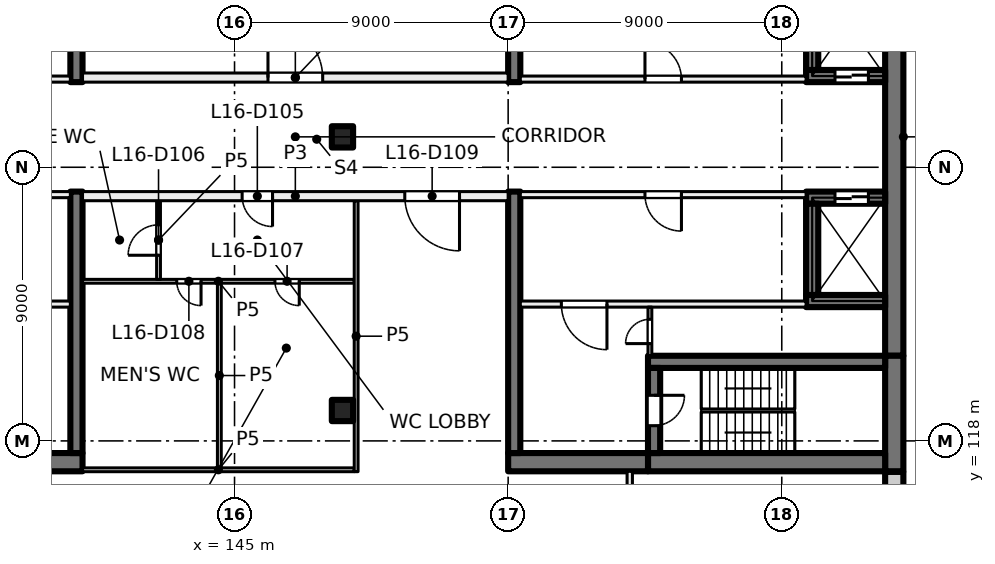
"""IFC4 building model, lengths in metres.
Left out: names, types, materials, properties, quantities, classifications, styles, units other than length and angle.
Written with IfcOpenShell. Run it as: python <this file> out.ifc"""

import sys

from ifc_helpers import new_model, si_unit, direction, frame, frame_2d, origin, origin_2d, place, context, subcontext, project, spatial, rectangle, extrude, element, fill, save


model = new_model("IFC4")
c1 = context("Model", 3, precision=1e-05, world=origin(), true_north=direction((0.0, 1.0)))
c2 = subcontext(c1, "Body", "Model", "MODEL_VIEW")
j1 = project(units=[si_unit("LENGTHUNIT", "METRE"), si_unit("PLANEANGLEUNIT", "RADIAN")], contexts=[c1])
p1 = place(None, origin())
s1 = spatial("IfcSite", under=j1, at=p1, CompositionType="ELEMENT")
p2 = place(p1, origin())
s2 = spatial("IfcBuilding", under=s1, at=p2, CompositionType="ELEMENT")
p3 = place(p2, frame((0.0, 0.0, 71.5)))
s3 = spatial("IfcBuildingStorey", under=s2, at=p3, CompositionType="ELEMENT", Elevation=71.5)
for number, where, z_axis, x_axis in (
    (1, (148.55, 119.0, 0.0), (0.0, 0.0, 1.0), (1.0, 0.0, 0.0)),
    (2, (148.55, 128.0, 0.0), (0.0, 0.0, 1.0), (1.0, 0.0, 0.0)),
):
    element("IfcColumn", number, at=place(p3, frame(where, z_axis=z_axis, x_axis=x_axis)), inside=s3, PredefinedType="COLUMN", context=c2, shape_type="SweptSolid", body=[
        extrude(rectangle(XDim=0.7, YDim=0.7, at=origin_2d()), origin(), (0.0, 0.0, 1.0), 4.0),
    ])
p4 = place(p3, frame((135.4, 117.3, 0.0), z_axis=(0.0, 0.0, 1.0), x_axis=(1.0, 0.0, 0.0)))
e3 = element("IfcWall", 3, at=p4, inside=s3, PredefinedType="SHEAR", context=c2, shape_type="SweptSolid", body=[
    extrude(rectangle(XDim=4.6, YDim=0.6, at=frame_2d((2.3, 0.0))), origin(), (0.0, 0.0, 1.0), 4.0),
])
for number, where, z_axis, x_axis in (
    (4, (139.8, 117.6, 0.0), (0.0, 0.0, 1.0), (0.0, 1.0, 0.0)),
    (5, (139.8, 129.8, 0.0), (0.0, 0.0, 1.0), (0.0, 1.0, 0.0)),
):
    element("IfcWall", number, at=place(p3, frame(where, z_axis=z_axis, x_axis=x_axis)), inside=s3, PredefinedType="SHEAR", context=c2, shape_type="SweptSolid", body=[
        extrude(rectangle(XDim=8.6, YDim=0.4, at=frame_2d((4.3, 0.0))), origin(), (0.0, 0.0, 1.0), 4.0),
    ])
p5 = place(p3, frame((166.7, 135.2, 0.0), z_axis=(0.0, 0.0, 1.0), x_axis=(0.0, -1.0, 0.0)))
e6 = element("IfcWall", 6, at=p5, inside=s3, PredefinedType="SHEAR", context=c2, shape_type="SweptSolid", body=[
    extrude(rectangle(XDim=14.4, YDim=0.6, at=frame_2d((7.2, 0.0))), origin(), (0.0, 0.0, 1.0), 4.0),
])
p6 = place(p3, frame((166.7, 120.8, 0.0), z_axis=(0.0, 0.0, 1.0), x_axis=(0.0, -1.0, 0.0)))
e7 = element("IfcWall", 7, at=p6, inside=s3, PredefinedType="SHEAR", context=c2, shape_type="SweptSolid", body=[
    extrude(rectangle(XDim=3.8, YDim=0.6, at=frame_2d((1.9, 0.0))), origin(), (0.0, 0.0, 1.0), 4.0),
])
p7 = place(p3, frame((166.4, 117.3, 0.0), z_axis=(0.0, 0.0, 1.0), x_axis=(-1.0, 0.0, 0.0)))
e8 = element("IfcWall", 8, at=p7, inside=s3, PredefinedType="SHEAR", context=c2, shape_type="SweptSolid", body=[
    extrude(rectangle(XDim=7.8, YDim=0.6, at=frame_2d((3.9, 0.0))), origin(), (0.0, 0.0, 1.0), 4.0),
])
p8 = place(p3, frame((158.6, 117.3, 0.0), z_axis=(0.0, 0.0, 1.0), x_axis=(-1.0, 0.0, 0.0)))
e9 = element("IfcWall", 9, at=p8, inside=s3, PredefinedType="SHEAR", context=c2, shape_type="SweptSolid", body=[
    extrude(rectangle(XDim=4.6, YDim=0.6, at=frame_2d((2.3, 0.0))), origin(), (0.0, 0.0, 1.0), 4.0),
])
p9 = place(p3, frame((166.4, 120.6, 0.0), z_axis=(0.0, 0.0, 1.0), x_axis=(-1.0, 0.0, 0.0)))
e10 = element("IfcWall", 10, at=p9, inside=s3, PredefinedType="SHEAR", context=c2, shape_type="SweptSolid", body=[
    extrude(rectangle(XDim=7.8, YDim=0.4, at=frame_2d((3.9, 0.0))), origin(), (0.0, 0.0, 1.0), 4.0),
])
p10 = place(p3, frame((158.8, 120.4, 0.0), z_axis=(0.0, 0.0, 1.0), x_axis=(0.0, -1.0, 0.0)))
e11 = element("IfcWall", 11, at=p10, inside=s3, PredefinedType="SHEAR", context=c2, shape_type="SweptSolid", body=[
    extrude(rectangle(XDim=2.8, YDim=0.4, at=frame_2d((1.4, 0.0))), origin(), (0.0, 0.0, 1.0), 4.0),
])
p11 = place(p10, frame((0.9, 0.0, 0.0)))
e12 = element("IfcOpeningElement", 12, at=p11, cuts=e11, PredefinedType="OPENING", context=c2, shape_type="SweptSolid", body=[
    extrude(rectangle(XDim=1.0, YDim=2.1, at=frame_2d((0.5, 1.05))), frame((0.0, 0.21, 0.0), z_axis=(0.0, -1.0, 0.0), x_axis=(1.0, 0.0, 0.0)), (0.0, 0.0, 1.0), 0.42),
])
p12 = place(p3, frame((166.4, 130.0, 0.0), z_axis=(0.0, 0.0, 1.0), x_axis=(-1.0, 0.0, 0.0)))
e13 = element("IfcWall", 13, at=p12, inside=s3, PredefinedType="SHEAR", context=c2, shape_type="SweptSolid", body=[
    extrude(rectangle(XDim=2.6, YDim=0.4, at=frame_2d((1.3, 0.0))), origin(), (0.0, 0.0, 1.0), 4.0),
])
p13 = place(p12, frame((0.55, 0.0, 0.0)))
e14 = element("IfcOpeningElement", 14, at=p13, cuts=e13, PredefinedType="OPENING", context=c2, shape_type="SweptSolid", body=[
    extrude(rectangle(XDim=1.1, YDim=2.1, at=frame_2d((0.55, 1.05))), frame((0.0, 0.21, 0.0), z_axis=(0.0, -1.0, 0.0), x_axis=(1.0, 0.0, 0.0)), (0.0, 0.0, 1.0), 0.42),
])
p14 = place(p3, frame((164.0, 133.2, 0.0), z_axis=(0.0, 0.0, 1.0), x_axis=(0.0, -1.0, 0.0)))
e15 = element("IfcWall", 15, at=p14, inside=s3, PredefinedType="SHEAR", context=c2, shape_type="SweptSolid", body=[
    extrude(rectangle(XDim=3.0, YDim=0.4, at=frame_2d((1.5, 0.0))), origin(), (0.0, 0.0, 1.0), 4.0),
])
p15 = place(p3, frame((166.4, 126.0, 0.0), z_axis=(0.0, 0.0, 1.0), x_axis=(-1.0, 0.0, 0.0)))
e16 = element("IfcWall", 16, at=p15, inside=s3, PredefinedType="SHEAR", context=c2, shape_type="SweptSolid", body=[
    extrude(rectangle(XDim=2.6, YDim=0.4, at=frame_2d((1.3, 0.0))), origin(), (0.0, 0.0, 1.0), 4.0),
])
p16 = place(p15, frame((0.55, 0.0, 0.0)))
e17 = element("IfcOpeningElement", 17, at=p16, cuts=e16, PredefinedType="OPENING", context=c2, shape_type="SweptSolid", body=[
    extrude(rectangle(XDim=1.1, YDim=2.1, at=frame_2d((0.55, 1.05))), frame((0.0, 0.21, 0.0), z_axis=(0.0, -1.0, 0.0), x_axis=(1.0, 0.0, 0.0)), (0.0, 0.0, 1.0), 0.42),
])
p17 = place(p3, frame((166.4, 122.6, 0.0), z_axis=(0.0, 0.0, 1.0), x_axis=(-1.0, 0.0, 0.0)))
e18 = element("IfcWall", 18, at=p17, inside=s3, PredefinedType="SHEAR", context=c2, shape_type="SweptSolid", body=[
    extrude(rectangle(XDim=2.6, YDim=0.4, at=frame_2d((1.3, 0.0))), origin(), (0.0, 0.0, 1.0), 4.0),
])
p18 = place(p3, frame((164.0, 125.8, 0.0), z_axis=(0.0, 0.0, 1.0), x_axis=(0.0, -1.0, 0.0)))
e19 = element("IfcWall", 19, at=p18, inside=s3, PredefinedType="SHEAR", context=c2, shape_type="SweptSolid", body=[
    extrude(rectangle(XDim=3.0, YDim=0.4, at=frame_2d((1.5, 0.0))), origin(), (0.0, 0.0, 1.0), 4.0),
])
for number, where, z_axis, x_axis in (
    (20, (154.2, 138.4, 0.0), (0.0, 0.0, 1.0), (0.0, -1.0, 0.0)),
    (21, (154.2, 126.2, 0.0), (0.0, 0.0, 1.0), (0.0, -1.0, 0.0)),
):
    element("IfcWall", number, at=place(p3, frame(where, z_axis=z_axis, x_axis=x_axis)), inside=s3, PredefinedType="SHEAR", context=c2, shape_type="SweptSolid", body=[
        extrude(rectangle(XDim=8.6, YDim=0.4, at=frame_2d((4.3, 0.0))), origin(), (0.0, 0.0, 1.0), 4.0),
    ])
p19 = place(p3, frame((166.7, 116.98, 0.0), z_axis=(0.0, 0.0, 1.0), x_axis=(0.0, -1.0, 0.0)))
e22 = element("IfcWall", 22, at=p19, inside=s3, PredefinedType="SOLIDWALL", context=c2, shape_type="SweptSolid", body=[
    extrude(rectangle(XDim=2.98, YDim=0.6, at=frame_2d((1.49, 0.0))), origin(), (0.0, 0.0, 1.0), 3.625),
])
p20 = place(p3, frame((135.0, 129.9, 0.0), z_axis=(0.0, 0.0, 1.0), x_axis=(1.0, 0.0, 0.0)))
e23 = element("IfcWall", 23, at=p20, inside=s3, PredefinedType="PARTITIONING", context=c2, shape_type="SweptSolid", body=[
    extrude(rectangle(XDim=4.6, YDim=0.2, at=frame_2d((2.3, 0.0))), origin(), (0.0, 0.0, 1.0), 3.625),
])
p21 = place(p20, frame((1.7, 0.0, 0.0)))
e24 = element("IfcOpeningElement", 24, at=p21, cuts=e23, PredefinedType="OPENING", context=c2, shape_type="SweptSolid", body=[
    extrude(rectangle(XDim=1.2, YDim=2.1, at=frame_2d((0.6, 1.05))), frame((0.0, 0.11, 0.0), z_axis=(0.0, -1.0, 0.0), x_axis=(1.0, 0.0, 0.0)), (0.0, 0.0, 1.0), 0.22),
])
p22 = place(p3, frame((139.6, 126.1, 0.0), z_axis=(0.0, 0.0, 1.0), x_axis=(-1.0, 0.0, 0.0)))
e25 = element("IfcWall", 25, at=p22, inside=s3, PredefinedType="PARTITIONING", context=c2, shape_type="SweptSolid", body=[
    extrude(rectangle(XDim=4.6, YDim=0.2, at=frame_2d((2.3, 0.0))), origin(), (0.0, 0.0, 1.0), 3.625),
])
p23 = place(p22, frame((1.7, 0.0, 0.0)))
e26 = element("IfcOpeningElement", 26, at=p23, cuts=e25, PredefinedType="OPENING", context=c2, shape_type="SweptSolid", body=[
    extrude(rectangle(XDim=1.2, YDim=2.1, at=frame_2d((0.6, 1.05))), frame((0.0, 0.11, 0.0), z_axis=(0.0, -1.0, 0.0), x_axis=(1.0, 0.0, 0.0)), (0.0, 0.0, 1.0), 0.22),
])
p24 = place(p3, frame((139.6, 122.5, 0.0), z_axis=(0.0, 0.0, 1.0), x_axis=(-1.0, 0.0, 0.0)))
e27 = element("IfcWall", 27, at=p24, inside=s3, PredefinedType="PARTITIONING", context=c2, shape_type="SweptSolid", body=[
    extrude(rectangle(XDim=4.6, YDim=0.2, at=frame_2d((2.3, 0.0))), origin(), (0.0, 0.0, 1.0), 3.625),
])
p25 = place(p24, frame((1.35, 0.0, 0.0)))
e28 = element("IfcOpeningElement", 28, at=p25, cuts=e27, PredefinedType="OPENING", context=c2, shape_type="SweptSolid", body=[
    extrude(rectangle(XDim=1.5, YDim=2.1, at=frame_2d((0.75, 1.05))), frame((0.0, 0.11, 0.0), z_axis=(0.0, -1.0, 0.0), x_axis=(1.0, 0.0, 0.0)), (0.0, 0.0, 1.0), 0.22),
])
p26 = place(p3, frame((163.8, 126.1, 0.0), z_axis=(0.0, 0.0, 1.0), x_axis=(-1.0, 0.0, 0.0)))
e29 = element("IfcWall", 29, at=p26, inside=s3, PredefinedType="PARTITIONING", context=c2, shape_type="SweptSolid", body=[
    extrude(rectangle(XDim=9.4, YDim=0.2, at=frame_2d((4.7, 0.0))), origin(), (0.0, 0.0, 1.0), 3.625),
])
p27 = place(p26, frame((4.1, 0.0, 0.0)))
e30 = element("IfcOpeningElement", 30, at=p27, cuts=e29, PredefinedType="OPENING", context=c2, shape_type="SweptSolid", body=[
    extrude(rectangle(XDim=1.2, YDim=2.1, at=frame_2d((0.6, 1.05))), frame((0.0, 0.11, 0.0), z_axis=(0.0, -1.0, 0.0), x_axis=(1.0, 0.0, 0.0)), (0.0, 0.0, 1.0), 0.22),
])
p28 = place(p3, frame((163.8, 122.5, 0.0), z_axis=(0.0, 0.0, 1.0), x_axis=(-1.0, 0.0, 0.0)))
e31 = element("IfcWall", 31, at=p28, inside=s3, PredefinedType="PARTITIONING", context=c2, shape_type="SweptSolid", body=[
    extrude(rectangle(XDim=9.4, YDim=0.2, at=frame_2d((4.7, 0.0))), origin(), (0.0, 0.0, 1.0), 3.625),
])
p29 = place(p28, frame((6.55, 0.0, 0.0)))
e32 = element("IfcOpeningElement", 32, at=p29, cuts=e31, PredefinedType="OPENING", context=c2, shape_type="SweptSolid", body=[
    extrude(rectangle(XDim=1.5, YDim=2.1, at=frame_2d((0.75, 1.05))), frame((0.0, 0.11, 0.0), z_axis=(0.0, -1.0, 0.0), x_axis=(1.0, 0.0, 0.0)), (0.0, 0.0, 1.0), 0.22),
])
p30 = place(p3, frame((158.663, 120.8, 0.0), z_axis=(0.0, 0.0, 1.0), x_axis=(0.0, 1.0, 0.0)))
e33 = element("IfcWall", 33, at=p30, inside=s3, PredefinedType="PARTITIONING", context=c2, shape_type="SweptSolid", body=[
    extrude(rectangle(XDim=1.6, YDim=0.125, at=frame_2d((0.8, 0.0))), origin(), (0.0, 0.0, 1.0), 3.625),
])
p31 = place(p30, frame((0.4, 0.0, 0.0)))
e34 = element("IfcOpeningElement", 34, at=p31, cuts=e33, PredefinedType="OPENING", context=c2, shape_type="SweptSolid", body=[
    extrude(rectangle(XDim=0.8, YDim=2.1, at=frame_2d((0.4, 1.05))), frame((0.0, 0.073, 0.0), z_axis=(0.0, -1.0, 0.0), x_axis=(1.0, 0.0, 0.0)), (0.0, 0.0, 1.0), 0.145),
])
p32 = place(p3, frame((154.4, 129.9, 0.0), z_axis=(0.0, 0.0, 1.0), x_axis=(1.0, 0.0, 0.0)))
e35 = element("IfcWall", 35, at=p32, inside=s3, PredefinedType="PARTITIONING", context=c2, shape_type="SweptSolid", body=[
    extrude(rectangle(XDim=9.4, YDim=0.2, at=frame_2d((4.7, 0.0))), origin(), (0.0, 0.0, 1.0), 3.625),
])
p33 = place(p32, frame((4.1, 0.0, 0.0)))
e36 = element("IfcOpeningElement", 36, at=p33, cuts=e35, PredefinedType="OPENING", context=c2, shape_type="SweptSolid", body=[
    extrude(rectangle(XDim=1.2, YDim=2.1, at=frame_2d((0.6, 1.05))), frame((0.0, 0.11, 0.0), z_axis=(0.0, -1.0, 0.0), x_axis=(1.0, 0.0, 0.0)), (0.0, 0.0, 1.0), 0.22),
])
p34 = place(p3, frame((140.0, 117.05, 0.0), z_axis=(0.0, 0.0, 1.0), x_axis=(1.0, 0.0, 0.0)))
e37 = element("IfcWall", 37, at=p34, inside=s3, PredefinedType="PARTITIONING", context=c2, shape_type="SweptSolid", body=[
    extrude(rectangle(XDim=8.938, YDim=0.125, at=frame_2d((4.469, 0.0))), origin(), (0.0, 0.0, 1.0), 3.625),
])
p35 = place(p3, frame((148.938, 123.25, 0.0), z_axis=(0.0, 0.0, 1.0), x_axis=(-1.0, 0.0, 0.0)))
e38 = element("IfcWall", 38, at=p35, inside=s3, PredefinedType="PARTITIONING", context=c2, shape_type="SweptSolid", body=[
    extrude(rectangle(XDim=8.938, YDim=0.125, at=frame_2d((4.469, 0.0))), origin(), (0.0, 0.0, 1.0), 3.625),
])
p36 = place(p35, frame((1.809, 0.0, 0.0)))
e39 = element("IfcOpeningElement", 39, at=p36, cuts=e38, PredefinedType="OPENING", context=c2, shape_type="SweptSolid", body=[
    extrude(rectangle(XDim=0.8, YDim=2.1, at=frame_2d((0.4, 1.05))), frame((0.0, 0.073, 0.0), z_axis=(0.0, -1.0, 0.0), x_axis=(1.0, 0.0, 0.0)), (0.0, 0.0, 1.0), 0.145),
])
p37 = place(p35, frame((5.04, 0.0, 0.0)))
e40 = element("IfcOpeningElement", 40, at=p37, cuts=e38, PredefinedType="OPENING", context=c2, shape_type="SweptSolid", body=[
    extrude(rectangle(XDim=0.8, YDim=2.1, at=frame_2d((0.4, 1.05))), frame((0.0, 0.073, 0.0), z_axis=(0.0, -1.0, 0.0), x_axis=(1.0, 0.0, 0.0)), (0.0, 0.0, 1.0), 0.145),
])
p38 = place(p3, frame((140.0, 129.95, 0.0), z_axis=(0.0, 0.0, 1.0), x_axis=(1.0, 0.0, 0.0)))
e41 = element("IfcWall", 41, at=p38, inside=s3, PredefinedType="PARTITIONING", context=c2, shape_type="SweptSolid", body=[
    extrude(rectangle(XDim=14.0, YDim=0.3, at=frame_2d((7.0, 0.0))), origin(), (0.0, 0.0, 1.0), 3.625),
])
p39 = place(p38, frame((6.1, 0.0, 0.0)))
e42 = element("IfcOpeningElement", 42, at=p39, cuts=e41, PredefinedType="OPENING", context=c2, shape_type="SweptSolid", body=[
    extrude(rectangle(XDim=1.8, YDim=2.1, at=frame_2d((0.9, 1.05))), frame((0.0, 0.16, 0.0), z_axis=(0.0, -1.0, 0.0), x_axis=(1.0, 0.0, 0.0)), (0.0, 0.0, 1.0), 0.32),
])
p40 = place(p3, frame((142.5, 123.312, 0.0), z_axis=(0.0, 0.0, 1.0), x_axis=(0.0, 1.0, 0.0)))
e43 = element("IfcWall", 43, at=p40, inside=s3, PredefinedType="PARTITIONING", context=c2, shape_type="SweptSolid", body=[
    extrude(rectangle(XDim=2.588, YDim=0.125, at=frame_2d((1.294, 0.0))), origin(), (0.0, 0.0, 1.0), 3.625),
])
p41 = place(p40, frame((0.794, 0.0, 0.0)))
e44 = element("IfcOpeningElement", 44, at=p41, cuts=e43, PredefinedType="OPENING", context=c2, shape_type="SweptSolid", body=[
    extrude(rectangle(XDim=1.0, YDim=2.1, at=frame_2d((0.5, 1.05))), frame((0.0, 0.073, 0.0), z_axis=(0.0, -1.0, 0.0), x_axis=(1.0, 0.0, 0.0)), (0.0, 0.0, 1.0), 0.145),
])
p42 = place(p3, frame((144.5, 123.188, 0.0), z_axis=(0.0, 0.0, 1.0), x_axis=(0.0, -1.0, 0.0)))
e45 = element("IfcWall", 45, at=p42, inside=s3, PredefinedType="PARTITIONING", context=c2, shape_type="SweptSolid", body=[
    extrude(rectangle(XDim=6.076, YDim=0.125, at=frame_2d((3.038, 0.0))), origin(), (0.0, 0.0, 1.0), 3.625),
])
p43 = place(p3, frame((149.0, 116.988, 0.0), z_axis=(0.0, 0.0, 1.0), x_axis=(0.0, 1.0, 0.0)))
e46 = element("IfcWall", 46, at=p43, inside=s3, PredefinedType="PARTITIONING", context=c2, shape_type="SweptSolid", body=[
    extrude(rectangle(XDim=8.912, YDim=0.125, at=frame_2d((4.456, 0.0))), origin(), (0.0, 0.0, 1.0), 3.625),
])
p44 = place(p3, frame((154.0, 126.05, 0.0), z_axis=(0.0, 0.0, 1.0), x_axis=(-1.0, 0.0, 0.0)))
e47 = element("IfcWall", 47, at=p44, inside=s3, PredefinedType="PARTITIONING", context=c2, shape_type="SweptSolid", body=[
    extrude(rectangle(XDim=14.0, YDim=0.3, at=frame_2d((7.0, 0.0))), origin(), (0.0, 0.0, 1.0), 3.625),
])
p45 = place(p44, frame((7.75, 0.0, 0.0)))
e48 = element("IfcOpeningElement", 48, at=p45, cuts=e47, PredefinedType="OPENING", context=c2, shape_type="SweptSolid", body=[
    extrude(rectangle(XDim=1.0, YDim=2.1, at=frame_2d((0.5, 1.05))), frame((0.0, 0.16, 0.0), z_axis=(0.0, -1.0, 0.0), x_axis=(1.0, 0.0, 0.0)), (0.0, 0.0, 1.0), 0.32),
])
p46 = place(p44, frame((1.6, 0.0, 0.0)))
e49 = element("IfcOpeningElement", 49, at=p46, cuts=e47, PredefinedType="OPENING", context=c2, shape_type="SweptSolid", body=[
    extrude(rectangle(XDim=1.8, YDim=2.1, at=frame_2d((0.9, 1.05))), frame((0.0, 0.16, 0.0), z_axis=(0.0, -1.0, 0.0), x_axis=(1.0, 0.0, 0.0)), (0.0, 0.0, 1.0), 0.32),
])
p47 = place(p3, frame((158.0, 110.6, 0.0), z_axis=(0.0, 0.0, 1.0), x_axis=(0.0, 1.0, 0.0)))
e50 = element("IfcWall", 50, at=p47, inside=s3, PredefinedType="PARTITIONING", context=c2, shape_type="SweptSolid", body=[
    extrude(rectangle(XDim=6.4, YDim=0.175, at=frame_2d((3.2, 0.0))), origin(), (0.0, 0.0, 1.0), 3.625),
])
p48 = place(p47, frame((2.6, 0.0, 0.0)))
e51 = element("IfcOpeningElement", 51, at=p48, cuts=e50, PredefinedType="OPENING", context=c2, shape_type="SweptSolid", body=[
    extrude(rectangle(XDim=1.2, YDim=2.1, at=frame_2d((0.6, 1.05))), frame((0.0, 0.097, 0.0), z_axis=(0.0, -1.0, 0.0), x_axis=(1.0, 0.0, 0.0)), (0.0, 0.0, 1.0), 0.195),
])
p49 = place(p16, origin())
e52 = element("IfcDoor", 52, at=p49, inside=s3, OperationType="DOUBLE_DOOR_SLIDING", PredefinedType="DOOR", context=c2, shape_type="SweptSolid", body=[
    extrude(rectangle(XDim=1.1, YDim=2.1, at=frame_2d((0.55, 1.05))), frame((0.0, 0.025, 0.0), z_axis=(0.0, -1.0, 0.0), x_axis=(1.0, 0.0, 0.0)), (0.0, 0.0, 1.0), 0.05),
])
fill(e17, e52)
p50 = place(p13, origin())
e53 = element("IfcDoor", 53, at=p50, inside=s3, OperationType="DOUBLE_DOOR_SLIDING", PredefinedType="DOOR", context=c2, shape_type="SweptSolid", body=[
    extrude(rectangle(XDim=1.1, YDim=2.1, at=frame_2d((0.55, 1.05))), frame((0.0, 0.025, 0.0), z_axis=(0.0, -1.0, 0.0), x_axis=(1.0, 0.0, 0.0)), (0.0, 0.0, 1.0), 0.05),
])
fill(e14, e53)
p51 = place(p27, origin())
e54 = element("IfcDoor", 54, at=p51, inside=s3, OperationType="DOUBLE_DOOR_SINGLE_SWING", PredefinedType="DOOR", context=c2, shape_type="SweptSolid", body=[
    extrude(rectangle(XDim=1.2, YDim=2.1, at=frame_2d((0.6, 1.05))), frame((0.0, 0.025, 0.0), z_axis=(0.0, -1.0, 0.0), x_axis=(1.0, 0.0, 0.0)), (0.0, 0.0, 1.0), 0.05),
])
fill(e30, e54)
p52 = place(p29, origin())
e55 = element("IfcDoor", 55, at=p52, inside=s3, OperationType="DOUBLE_DOOR_SINGLE_SWING", PredefinedType="DOOR", context=c2, shape_type="SweptSolid", body=[
    extrude(rectangle(XDim=1.5, YDim=2.1, at=frame_2d((0.75, 1.05))), frame((0.0, 0.025, 0.0), z_axis=(0.0, -1.0, 0.0), x_axis=(1.0, 0.0, 0.0)), (0.0, 0.0, 1.0), 0.05),
])
fill(e32, e55)
p53 = place(p11, origin())
e56 = element("IfcDoor", 56, at=p53, inside=s3, OperationType="SINGLE_SWING_LEFT", PredefinedType="DOOR", context=c2, shape_type="SweptSolid", body=[
    extrude(rectangle(XDim=1.0, YDim=2.1, at=frame_2d((0.5, 1.05))), frame((0.0, 0.025, 0.0), z_axis=(0.0, -1.0, 0.0), x_axis=(1.0, 0.0, 0.0)), (0.0, 0.0, 1.0), 0.05),
])
fill(e12, e56)
p54 = place(p31, origin())
e57 = element("IfcDoor", 57, at=p54, inside=s3, OperationType="SINGLE_SWING_RIGHT", PredefinedType="DOOR", context=c2, shape_type="SweptSolid", body=[
    extrude(rectangle(XDim=0.8, YDim=2.1, at=frame_2d((0.4, 1.05))), frame((0.0, 0.025, 0.0), z_axis=(0.0, -1.0, 0.0), x_axis=(1.0, 0.0, 0.0)), (0.0, 0.0, 1.0), 0.05),
])
fill(e34, e57)
p55 = place(p33, origin())
e58 = element("IfcDoor", 58, at=p55, inside=s3, OperationType="DOUBLE_DOOR_SINGLE_SWING", PredefinedType="DOOR", context=c2, shape_type="SweptSolid", body=[
    extrude(rectangle(XDim=1.2, YDim=2.1, at=frame_2d((0.6, 1.05))), frame((0.0, 0.025, 0.0), z_axis=(0.0, -1.0, 0.0), x_axis=(1.0, 0.0, 0.0)), (0.0, 0.0, 1.0), 0.05),
])
fill(e36, e58)
p56 = place(p39, origin())
e59 = element("IfcDoor", 59, at=p56, inside=s3, OperationType="DOUBLE_DOOR_SINGLE_SWING", PredefinedType="DOOR", context=c2, shape_type="SweptSolid", body=[
    extrude(rectangle(XDim=1.8, YDim=2.1, at=frame_2d((0.9, 1.05))), frame((0.0, 0.025, 0.0), z_axis=(0.0, -1.0, 0.0), x_axis=(1.0, 0.0, 0.0)), (0.0, 0.0, 1.0), 0.05),
])
fill(e42, e59)
p57 = place(p45, origin())
e60 = element("IfcDoor", 60, at=p57, inside=s3, OperationType="SINGLE_SWING_RIGHT", PredefinedType="DOOR", context=c2, shape_type="SweptSolid", body=[
    extrude(rectangle(XDim=1.0, YDim=2.1, at=frame_2d((0.5, 1.05))), frame((0.0, 0.025, 0.0), z_axis=(0.0, -1.0, 0.0), x_axis=(1.0, 0.0, 0.0)), (0.0, 0.0, 1.0), 0.05),
])
fill(e48, e60)
p58 = place(p41, origin())
e61 = element("IfcDoor", 61, at=p58, inside=s3, OperationType="SINGLE_SWING_RIGHT", PredefinedType="DOOR", context=c2, shape_type="SweptSolid", body=[
    extrude(rectangle(XDim=1.0, YDim=2.1, at=frame_2d((0.5, 1.05))), frame((0.0, 0.025, 0.0), z_axis=(0.0, -1.0, 0.0), x_axis=(1.0, 0.0, 0.0)), (0.0, 0.0, 1.0), 0.05),
])
fill(e44, e61)
p59 = place(p36, origin())
e62 = element("IfcDoor", 62, at=p59, inside=s3, OperationType="SINGLE_SWING_LEFT", PredefinedType="DOOR", context=c2, shape_type="SweptSolid", body=[
    extrude(rectangle(XDim=0.8, YDim=2.1, at=frame_2d((0.4, 1.05))), frame((0.0, 0.025, 0.0), z_axis=(0.0, -1.0, 0.0), x_axis=(1.0, 0.0, 0.0)), (0.0, 0.0, 1.0), 0.05),
])
fill(e39, e62)
p60 = place(p37, origin())
e63 = element("IfcDoor", 63, at=p60, inside=s3, OperationType="SINGLE_SWING_LEFT", PredefinedType="DOOR", context=c2, shape_type="SweptSolid", body=[
    extrude(rectangle(XDim=0.8, YDim=2.1, at=frame_2d((0.4, 1.05))), frame((0.0, 0.025, 0.0), z_axis=(0.0, -1.0, 0.0), x_axis=(1.0, 0.0, 0.0)), (0.0, 0.0, 1.0), 0.05),
])
fill(e40, e63)
p61 = place(p46, origin())
e64 = element("IfcDoor", 64, at=p61, inside=s3, OperationType="DOUBLE_DOOR_SINGLE_SWING", PredefinedType="DOOR", context=c2, shape_type="SweptSolid", body=[
    extrude(rectangle(XDim=1.8, YDim=2.1, at=frame_2d((0.9, 1.05))), frame((0.0, 0.025, 0.0), z_axis=(0.0, -1.0, 0.0), x_axis=(1.0, 0.0, 0.0)), (0.0, 0.0, 1.0), 0.05),
])
fill(e49, e64)
save(model, sys.argv[1])
